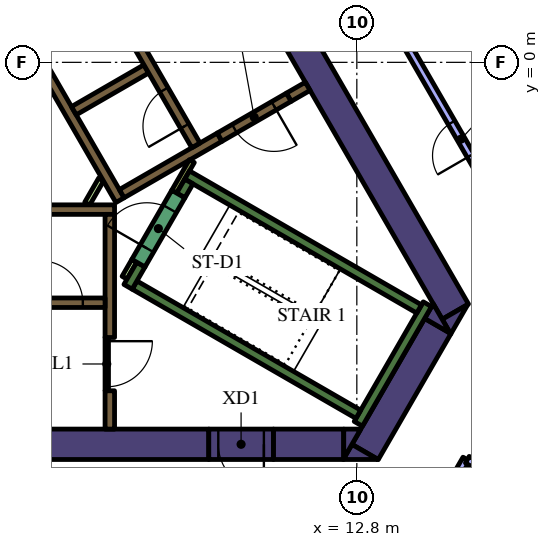
"""IFC4 building model, lengths in metres.
Left out: names, types, materials, properties, quantities, classifications, styles, units other than length and angle.
Written with IfcOpenShell. Run it as: python <this file> out.ifc"""

import sys

from ifc_helpers import new_model, si_unit, direction, frame, frame_2d, origin, place, context, subcontext, project, spatial, polyline, rectangle, outline, extrude, element, fill, save


model = new_model("IFC4")
c1 = context("Model", 3, precision=1e-05, world=origin(), true_north=direction((0.0, 1.0)))
c2 = subcontext(c1, "Body", "Model", "MODEL_VIEW")
j1 = project(units=[si_unit("LENGTHUNIT", "METRE"), si_unit("PLANEANGLEUNIT", "RADIAN")], contexts=[c1])
p1 = place(None, origin())
s1 = spatial("IfcSite", under=j1, at=p1, CompositionType="ELEMENT")
p2 = place(p1, origin())
s2 = spatial("IfcBuilding", under=s1, at=p2, CompositionType="ELEMENT")
p3 = place(p2, frame((0.0, 0.0, 154.2)))
s3 = spatial("IfcBuildingStorey", under=s2, at=p3, CompositionType="ELEMENT", Elevation=154.2)
p4 = place(p3, frame((9.129, 4.289, 0.0), z_axis=(0.0, 0.0, 1.0), x_axis=(0.499995742806, -0.866027861663, 0.0)))
e1 = element("IfcWall", 1, at=p4, inside=s3, PredefinedType="SOLIDWALL", context=c2, shape_type="SweptSolid", body=[
    extrude(rectangle(XDim=12.527, YDim=0.8, at=frame_2d((6.264, 0.0))), origin(), (0.0, 0.0, 1.0), 4.2),
])
p5 = place(p3, origin())
e2 = element("IfcWall", 2, at=p5, inside=s3, PredefinedType="SOLIDWALL", context=c2, shape_type="SweptSolid", body=[
    extrude(outline(polyline([(15.271, -7.15), (15.047, -6.762), (15.719, -6.374), (15.271, -7.15)])), origin(), (0.0, 0.0, 1.0), 4.2),
])
p6 = place(p3, frame((13.018, -10.252, 0.0), z_axis=(0.0, 0.0, 1.0), x_axis=(0.499984020225, 0.866034629516, 0.0)))
e3 = element("IfcWall", 3, at=p6, inside=s3, PredefinedType="SOLIDWALL", context=c2, shape_type="SweptSolid", body=[
    extrude(rectangle(XDim=3.824, YDim=0.8, at=frame_2d((1.912, 0.0))), origin(), (0.0, 0.0, 1.0), 4.2),
])
e4 = element("IfcWall", 4, at=p5, inside=s3, PredefinedType="SOLIDWALL", context=c2, shape_type="SweptSolid", body=[
    extrude(outline(polyline([(12.442, -10.45), (12.671, -10.053), (13.358, -10.45), (12.442, -10.45)])), origin(), (0.0, 0.0, 1.0), 4.2),
])
e5 = element("IfcWall", 5, at=p5, inside=s3, PredefinedType="SOLIDWALL", context=c2, shape_type="SweptSolid", body=[
    extrude(outline(polyline([(14.809, -6.35), (15.257, -7.126), (14.585, -6.738), (14.809, -6.35)])), origin(), (0.0, 0.0, 1.0), 4.2),
])
p7 = place(p3, frame((10.604, -10.05, 0.0), z_axis=(0.0, 0.0, 1.0), x_axis=(1.0, 0.0, 0.0)))
e6 = element("IfcWall", 6, at=p7, inside=s3, PredefinedType="SOLIDWALL", context=c2, shape_type="SweptSolid", body=[
    extrude(rectangle(XDim=1.849, YDim=0.8, at=frame_2d((0.925, 0.0))), origin(), (0.0, 0.0, 1.0), 4.2),
])
e7 = element("IfcWall", 7, at=p5, inside=s3, PredefinedType="SOLIDWALL", context=c2, shape_type="SweptSolid", body=[
    extrude(outline(polyline([(12.904, -9.65), (12.456, -10.426), (12.456, -9.65), (12.904, -9.65)])), origin(), (0.0, 0.0, 1.0), 4.2),
])
p8 = place(p3, frame((-13.378, -10.05, 0.0), z_axis=(0.0, 0.0, 1.0), x_axis=(1.0, 0.0, 0.0)))
e8 = element("IfcWall", 8, at=p8, inside=s3, PredefinedType="SOLIDWALL", context=c2, shape_type="SweptSolid", body=[
    extrude(rectangle(XDim=22.282, YDim=0.8, at=frame_2d((11.141, 0.0))), origin(), (0.0, 0.0, 1.0), 4.2),
])
p9 = place(p3, frame((12.84, -9.511, 0.0), z_axis=(0.0, 0.0, 1.0), x_axis=(0.499997733992, 0.866026712061, 0.0)))
e9 = element("IfcWall", 9, at=p9, inside=s3, PredefinedType="SOLIDWALL", context=c2, shape_type="SweptSolid", body=[
    extrude(rectangle(XDim=3.634, YDim=0.25, at=frame_2d((1.817, 0.0))), origin(), (0.0, 0.0, 1.0), 4.2),
])
p10 = place(p3, frame((12.84, -9.261, 0.0), z_axis=(0.0, 0.0, 1.0), x_axis=(-0.866013990052, 0.500019768644, 0.0)))
e10 = element("IfcWall", 10, at=p10, inside=s3, PredefinedType="SOLIDWALL", context=c2, shape_type="SweptSolid", body=[
    extrude(rectangle(XDim=6.8, YDim=0.25, at=frame_2d((3.4, 0.0))), origin(), (0.0, 0.0, 1.0), 4.2),
])
p11 = place(p3, frame((6.78, -5.906, 0.0), z_axis=(0.0, 0.0, 1.0), x_axis=(0.500223362819, 0.865896406789, 0.0)))
e11 = element("IfcWall", 11, at=p11, inside=s3, PredefinedType="SOLIDWALL", context=c2, shape_type="SweptSolid", body=[
    extrude(rectangle(XDim=0.675, YDim=0.25, at=frame_2d((0.337, 0.0))), origin(), (0.0, 0.0, 1.0), 4.2),
])
p12 = place(p3, frame((8.334, -2.964, 0.0), z_axis=(0.0, 0.0, 1.0), x_axis=(0.866016039709, -0.500016218704, 0.0)))
e12 = element("IfcWall", 12, at=p12, inside=s3, PredefinedType="SOLIDWALL", context=c2, shape_type="SweptSolid", body=[
    extrude(rectangle(XDim=7.05, YDim=0.25, at=frame_2d((3.525, 0.0))), origin(), (0.0, 0.0, 1.0), 4.2),
])
p13 = place(p3, frame((8.168, -3.503, 0.0), z_axis=(0.0, 0.0, 1.0), x_axis=(0.49972245349, 0.866185586049, 0.0)))
e13 = element("IfcWall", 13, at=p13, inside=s3, PredefinedType="SOLIDWALL", context=c2, shape_type="SweptSolid", body=[
    extrude(rectangle(XDim=0.425, YDim=0.25, at=frame_2d((0.212, 0.0))), origin(), (0.0, 0.0, 1.0), 4.2),
])
p14 = place(p3, frame((-5.545, -3.875, 0.0), z_axis=(0.0, 0.0, 1.0), x_axis=(1.0, 0.0, 0.0)))
e14 = element("IfcWall", 14, at=p14, inside=s3, PredefinedType="SOLIDWALL", context=c2, shape_type="SweptSolid", body=[
    extrude(rectangle(XDim=11.97, YDim=0.25, at=frame_2d((5.985, 0.0))), origin(), (0.0, 0.0, 1.0), 4.2),
])
p15 = place(p3, frame((6.3, -7.24, 0.0), z_axis=(0.0, 0.0, 1.0), x_axis=(0.0, 1.0, 0.0)))
e15 = element("IfcWall", 15, at=p15, inside=s3, PredefinedType="SOLIDWALL", context=c2, shape_type="SweptSolid", body=[
    extrude(rectangle(XDim=3.24, YDim=0.25, at=frame_2d((1.62, 0.0))), origin(), (0.0, 0.0, 1.0), 4.2),
])
p16 = place(p3, frame((6.3, -9.65, 0.0), z_axis=(0.0, 0.0, 1.0), x_axis=(0.0, 1.0, 0.0)))
e16 = element("IfcWall", 16, at=p16, inside=s3, PredefinedType="SOLIDWALL", context=c2, shape_type="SweptSolid", body=[
    extrude(rectangle(XDim=1.008, YDim=0.25, at=frame_2d((0.504, 0.0))), origin(), (0.0, 0.0, 1.0), 4.2),
])
p17 = place(p3, frame((11.507, -0.631, 0.0), z_axis=(0.0, 0.0, 1.0), x_axis=(-0.866093731455, -0.499881634324, 0.0)))
e17 = element("IfcWall", 17, at=p17, inside=s3, PredefinedType="SOLIDWALL", context=c2, shape_type="SweptSolid", body=[
    extrude(rectangle(XDim=0.575, YDim=0.25, at=frame_2d((0.288, 0.0))), origin(), (0.0, 0.0, 1.0), 4.2),
])
p18 = place(p3, frame((6.568, -3.627, 0.0), z_axis=(0.0, 0.0, 1.0), x_axis=(-0.499999455981, 0.866025717874, 0.0)))
e18 = element("IfcWall", 18, at=p18, inside=s3, PredefinedType="SOLIDWALL", context=c2, shape_type="SweptSolid", body=[
    extrude(rectangle(XDim=11.978, YDim=0.25, at=frame_2d((5.989, 0.0))), origin(), (0.0, 0.0, 1.0), 4.2),
])
p19 = place(p3, frame((5.354, -1.274, 0.0), z_axis=(0.0, 0.0, 1.0), x_axis=(0.866008176907, 0.50002983664, 0.0)))
e19 = element("IfcWall", 19, at=p19, inside=s3, PredefinedType="SOLIDWALL", context=c2, shape_type="SweptSolid", body=[
    extrude(rectangle(XDim=2.2, YDim=0.25, at=frame_2d((1.1, 0.0))), origin(), (0.0, 0.0, 1.0), 4.2),
])
p20 = place(p3, frame((6.614, -3.456, 0.0), z_axis=(0.0, 0.0, 1.0), x_axis=(0.866032512851, 0.499987686533, 0.0)))
e20 = element("IfcWall", 20, at=p20, inside=s3, PredefinedType="SOLIDWALL", context=c2, shape_type="SweptSolid", body=[
    extrude(rectangle(XDim=2.975, YDim=0.25, at=frame_2d((1.487, 0.0))), origin(), (0.0, 0.0, 1.0), 4.2),
])
p21 = place(p3, frame((6.945, -5.222, 0.0), z_axis=(0.0, 0.0, 1.0), x_axis=(-0.499818422106, -0.866130212453, 0.0)))
e21 = element("IfcWall", 21, at=p21, inside=s3, PredefinedType="PARTITIONING", context=c2, shape_type="SweptSolid", body=[
    extrude(rectangle(XDim=0.514, YDim=0.15, at=frame_2d((0.257, 0.0))), origin(), (0.0, 0.0, 1.0), 3.15),
])
p22 = place(p3, frame((8.459, -2.599, 0.0), z_axis=(0.0, 0.0, 1.0), x_axis=(-0.500041054325, -0.866001699761, 0.0)))
e22 = element("IfcWall", 22, at=p22, inside=s3, PredefinedType="PARTITIONING", context=c2, shape_type="SweptSolid", body=[
    extrude(rectangle(XDim=0.929, YDim=0.15, at=frame_2d((0.464, 0.0))), origin(), (0.0, 0.0, 1.0), 4.2),
])
p23 = place(p3, frame((5.705, -3.718, 0.0), z_axis=(0.0, 0.0, 1.0), x_axis=(0.499962090823, 0.866047289552, 0.0)))
e23 = element("IfcWall", 23, at=p23, inside=s3, PredefinedType="PARTITIONING", context=c2, shape_type="SweptSolid", body=[
    extrude(rectangle(XDim=0.735, YDim=0.15, at=frame_2d((0.367, 0.0))), origin(), (0.0, 0.0, 1.0), 3.15),
])
p24 = place(p3, frame((-6.175, -6.325, 0.0), z_axis=(0.0, 0.0, 1.0), x_axis=(1.0, 0.0, 0.0)))
e24 = element("IfcWall", 24, at=p24, inside=s3, PredefinedType="SOLIDWALL", context=c2, shape_type="SweptSolid", body=[
    extrude(rectangle(XDim=12.35, YDim=0.25, at=frame_2d((6.175, 0.0))), origin(), (0.0, 0.0, 1.0), 4.2),
])
p25 = place(p24, frame((0.585, 0.0, 0.0)))
e25 = element("IfcOpeningElement", 25, at=p25, cuts=e24, PredefinedType="OPENING", context=c2, shape_type="SweptSolid", body=[
    extrude(rectangle(XDim=1.1, YDim=2.1, at=frame_2d((0.55, 1.05))), frame((0.0, 0.135, 0.0), z_axis=(0.0, -1.0, 0.0), x_axis=(1.0, 0.0, 0.0)), (0.0, 0.0, 1.0), 0.27),
])
p26 = place(p24, frame((3.105, 0.0, 0.0)))
e26 = element("IfcOpeningElement", 26, at=p26, cuts=e24, PredefinedType="OPENING", context=c2, shape_type="SweptSolid", body=[
    extrude(rectangle(XDim=1.1, YDim=2.1, at=frame_2d((0.55, 1.05))), frame((0.0, 0.135, 0.0), z_axis=(0.0, -1.0, 0.0), x_axis=(1.0, 0.0, 0.0)), (0.0, 0.0, 1.0), 0.27),
])
p27 = place(p24, frame((5.625, 0.0, 0.0)))
e27 = element("IfcOpeningElement", 27, at=p27, cuts=e24, PredefinedType="OPENING", context=c2, shape_type="SweptSolid", body=[
    extrude(rectangle(XDim=1.1, YDim=2.1, at=frame_2d((0.55, 1.05))), frame((0.0, 0.135, 0.0), z_axis=(0.0, -1.0, 0.0), x_axis=(1.0, 0.0, 0.0)), (0.0, 0.0, 1.0), 0.27),
])
p28 = place(p24, frame((8.145, 0.0, 0.0)))
e28 = element("IfcOpeningElement", 28, at=p28, cuts=e24, PredefinedType="OPENING", context=c2, shape_type="SweptSolid", body=[
    extrude(rectangle(XDim=1.1, YDim=2.1, at=frame_2d((0.55, 1.05))), frame((0.0, 0.135, 0.0), z_axis=(0.0, -1.0, 0.0), x_axis=(1.0, 0.0, 0.0)), (0.0, 0.0, 1.0), 0.27),
])
p29 = place(p24, frame((10.665, 0.0, 0.0)))
e29 = element("IfcOpeningElement", 29, at=p29, cuts=e24, PredefinedType="OPENING", context=c2, shape_type="SweptSolid", body=[
    extrude(rectangle(XDim=1.1, YDim=2.1, at=frame_2d((0.55, 1.05))), frame((0.0, 0.135, 0.0), z_axis=(0.0, -1.0, 0.0), x_axis=(1.0, 0.0, 0.0)), (0.0, 0.0, 1.0), 0.27),
])
p30 = place(p3, frame((8.565, -2.185, 0.0), z_axis=(0.0, 0.0, 1.0), x_axis=(-0.499997954832, 0.866026584559, 0.0)))
e30 = element("IfcWall", 30, at=p30, inside=s3, PredefinedType="SOLIDWALL", context=c2, shape_type="SweptSolid", body=[
    extrude(rectangle(XDim=12.35, YDim=0.25, at=frame_2d((6.175, 0.0))), origin(), (0.0, 0.0, 1.0), 4.2),
])
p31 = place(p30, frame((0.585, 0.0, 0.0)))
e31 = element("IfcOpeningElement", 31, at=p31, cuts=e30, PredefinedType="OPENING", context=c2, shape_type="SweptSolid", body=[
    extrude(rectangle(XDim=1.1, YDim=2.1, at=frame_2d((0.55, 1.05))), frame((0.0, 0.135, 0.0), z_axis=(0.0, -1.0, 0.0), x_axis=(1.0, 0.0, 0.0)), (0.0, 0.0, 1.0), 0.27),
])
p32 = place(p3, frame((7.053, -5.284, 0.0), z_axis=(0.0, 0.0, 1.0), x_axis=(0.500078061341, 0.865980330357, 0.0)))
e32 = element("IfcWall", 32, at=p32, inside=s3, PredefinedType="SOLIDWALL", context=c2, shape_type="SweptSolid", body=[
    extrude(rectangle(XDim=2.1, YDim=0.4, at=frame_2d((1.05, 0.0))), origin(), (0.0, 0.0, 1.0), 4.2),
])
p33 = place(p32, frame((0.45, 0.0, 0.0)))
e33 = element("IfcOpeningElement", 33, at=p33, cuts=e32, PredefinedType="OPENING", context=c2, shape_type="SweptSolid", body=[
    extrude(rectangle(XDim=1.2, YDim=2.1, at=frame_2d((0.6, 1.05))), frame((0.0, 0.21, 0.0), z_axis=(0.0, -1.0, 0.0), x_axis=(1.0, 0.0, 0.0)), (0.0, 0.0, 1.0), 0.42),
])
p34 = place(p3, frame((6.22, -7.237, 0.0), z_axis=(0.0, 0.0, 1.0), x_axis=(0.0, -1.0, 0.0)))
e34 = element("IfcWall", 34, at=p34, inside=s3, PredefinedType="PARTITIONING", context=c2, shape_type="SweptSolid", body=[
    extrude(rectangle(XDim=1.4, YDim=0.09, at=frame_2d((0.7, 0.0))), origin(), (0.0, 0.0, 1.0), 3.15),
])
p35 = place(p34, frame((0.1, 0.0, 0.0)))
e35 = element("IfcOpeningElement", 35, at=p35, cuts=e34, PredefinedType="OPENING", context=c2, shape_type="SweptSolid", body=[
    extrude(rectangle(XDim=1.2, YDim=2.1, at=frame_2d((0.6, 1.05))), frame((0.0, 0.055, 0.0), z_axis=(0.0, -1.0, 0.0), x_axis=(1.0, 0.0, 0.0)), (0.0, 0.0, 1.0), 0.11),
])
p36 = place(p3, frame((11.009, -0.919, 0.0), z_axis=(0.0, 0.0, 1.0), x_axis=(-0.866059744384, -0.49994051562, 0.0)))
e36 = element("IfcWall", 36, at=p36, inside=s3, PredefinedType="SOLIDWALL", context=c2, shape_type="SweptSolid", body=[
    extrude(rectangle(XDim=2.1, YDim=0.25, at=frame_2d((1.05, 0.0))), origin(), (0.0, 0.0, 1.0), 4.2),
])
p37 = place(p36, frame((0.45, 0.0, 0.0)))
e37 = element("IfcOpeningElement", 37, at=p37, cuts=e36, PredefinedType="OPENING", context=c2, shape_type="SweptSolid", body=[
    extrude(rectangle(XDim=1.2, YDim=2.1, at=frame_2d((0.6, 1.05))), frame((0.0, 0.135, 0.0), z_axis=(0.0, -1.0, 0.0), x_axis=(1.0, 0.0, 0.0)), (0.0, 0.0, 1.0), 0.27),
])
p38 = place(p3, frame((10.604, -10.05, 0.0), z_axis=(0.0, 0.0, 1.0), x_axis=(-1.0, 0.0, 0.0)))
e38 = element("IfcWall", 38, at=p38, inside=s3, PredefinedType="SOLIDWALL", context=c2, shape_type="SweptSolid", body=[
    extrude(rectangle(XDim=1.7, YDim=0.8, at=frame_2d((0.85, 0.0))), origin(), (0.0, 0.0, 1.0), 4.2),
])
p39 = place(p38, frame((0.25, 0.0, 0.0)))
e39 = element("IfcOpeningElement", 39, at=p39, cuts=e38, PredefinedType="OPENING", context=c2, shape_type="SweptSolid", body=[
    extrude(rectangle(XDim=1.2, YDim=2.1, at=frame_2d((0.6, 1.05))), frame((0.0, 0.41, 0.0), z_axis=(0.0, -1.0, 0.0), x_axis=(1.0, 0.0, 0.0)), (0.0, 0.0, 1.0), 0.82),
])
p40 = place(p3, frame((14.589, -12.331, 0.0), z_axis=(0.0, 0.0, 1.0), x_axis=(0.500044870432, 0.865999496279, 0.0)))
e40 = element("IfcWall", 40, at=p40, inside=s3, PredefinedType="PARTITIONING", context=c2, shape_type="SweptSolid", body=[
    extrude(rectangle(XDim=2.185, YDim=0.2, at=frame_2d((1.092, 0.0))), origin(), (0.0, 0.0, 1.0), 3.15),
])
p41 = place(p3, frame((15.707, -10.454, 0.0), z_axis=(0.0, 0.0, 1.0), x_axis=(0.866017375886, -0.50001390447, 0.0)))
e41 = element("IfcWall", 41, at=p41, inside=s3, PredefinedType="PARTITIONING", context=c2, shape_type="SweptSolid", body=[
    extrude(rectangle(XDim=5.97, YDim=0.2, at=frame_2d((2.985, 0.0))), origin(), (0.0, 0.0, 1.0), 3.15),
])
p42 = place(p3, frame((18.042, -6.35, 0.0), z_axis=(0.0, 0.0, 1.0), x_axis=(-0.499986873641, 0.866032982159, 0.0)))
e42 = element("IfcWall", 42, at=p42, inside=s3, PredefinedType="PARTITIONING", context=c2, shape_type="SweptSolid", body=[
    extrude(rectangle(XDim=9.99, YDim=0.2, at=frame_2d((4.995, 0.0))), origin(), (0.0, 0.0, 1.0), 3.15),
])
p43 = place(p42, frame((4.5, 0.0, 0.0)))
e43 = element("IfcOpeningElement", 43, at=p43, cuts=e42, PredefinedType="OPENING", context=c2, shape_type="SweptSolid", body=[
    extrude(rectangle(XDim=1.0, YDim=2.1, at=frame_2d((0.5, 1.05))), frame((0.0, 0.11, 0.0), z_axis=(0.0, -1.0, 0.0), x_axis=(1.0, 0.0, 0.0)), (0.0, 0.0, 1.0), 0.22),
])
p44 = place(p29, origin())
e44 = element("IfcDoor", 44, at=p44, inside=s3, OperationType="DOUBLE_DOOR_SLIDING", PredefinedType="DOOR", context=c2, shape_type="SweptSolid", body=[
    extrude(rectangle(XDim=1.1, YDim=2.1, at=frame_2d((0.55, 1.05))), frame((0.0, 0.025, 0.0), z_axis=(0.0, -1.0, 0.0), x_axis=(1.0, 0.0, 0.0)), (0.0, 0.0, 1.0), 0.05),
])
fill(e29, e44)
p45 = place(p31, origin())
e45 = element("IfcDoor", 45, at=p45, inside=s3, OperationType="DOUBLE_DOOR_SLIDING", PredefinedType="DOOR", context=c2, shape_type="SweptSolid", body=[
    extrude(rectangle(XDim=1.1, YDim=2.1, at=frame_2d((0.55, 1.05))), frame((0.0, 0.025, 0.0), z_axis=(0.0, -1.0, 0.0), x_axis=(1.0, 0.0, 0.0)), (0.0, 0.0, 1.0), 0.05),
])
fill(e31, e45)
p46 = place(p33, origin())
e46 = element("IfcDoor", 46, at=p46, inside=s3, OperationType="SINGLE_SWING_LEFT", PredefinedType="DOOR", context=c2, shape_type="SweptSolid", body=[
    extrude(rectangle(XDim=1.2, YDim=2.1, at=frame_2d((0.6, 1.05))), frame((0.0, 0.025, 0.0), z_axis=(0.0, -1.0, 0.0), x_axis=(1.0, 0.0, 0.0)), (0.0, 0.0, 1.0), 0.05),
])
fill(e33, e46)
p47 = place(p35, origin())
e47 = element("IfcDoor", 47, at=p47, inside=s3, OperationType="SINGLE_SWING_LEFT", PredefinedType="DOOR", context=c2, shape_type="SweptSolid", body=[
    extrude(rectangle(XDim=1.2, YDim=2.1, at=frame_2d((0.6, 1.05))), frame((0.0, 0.025, 0.0), z_axis=(0.0, -1.0, 0.0), x_axis=(1.0, 0.0, 0.0)), (0.0, 0.0, 1.0), 0.05),
])
fill(e35, e47)
p48 = place(p37, origin())
e48 = element("IfcDoor", 48, at=p48, inside=s3, OperationType="SINGLE_SWING_LEFT", PredefinedType="DOOR", context=c2, shape_type="SweptSolid", body=[
    extrude(rectangle(XDim=1.2, YDim=2.1, at=frame_2d((0.6, 1.05))), frame((0.0, 0.025, 0.0), z_axis=(0.0, -1.0, 0.0), x_axis=(1.0, 0.0, 0.0)), (0.0, 0.0, 1.0), 0.05),
])
fill(e37, e48)
p49 = place(p39, origin())
e49 = element("IfcDoor", 49, at=p49, inside=s3, OperationType="SINGLE_SWING_LEFT", PredefinedType="DOOR", context=c2, shape_type="SweptSolid", body=[
    extrude(rectangle(XDim=1.2, YDim=2.1, at=frame_2d((0.6, 1.05))), frame((0.0, 0.025, 0.0), z_axis=(0.0, -1.0, 0.0), x_axis=(1.0, 0.0, 0.0)), (0.0, 0.0, 1.0), 0.05),
])
fill(e39, e49)
p50 = place(p43, origin())
e50 = element("IfcDoor", 50, at=p50, inside=s3, OperationType="SINGLE_SWING_RIGHT", PredefinedType="DOOR", context=c2, shape_type="SweptSolid", body=[
    extrude(rectangle(XDim=1.0, YDim=2.1, at=frame_2d((0.5, 1.05))), frame((0.0, 0.025, 0.0), z_axis=(0.0, -1.0, 0.0), x_axis=(1.0, 0.0, 0.0)), (0.0, 0.0, 1.0), 0.05),
])
fill(e43, e50)
save(model, sys.argv[1])
